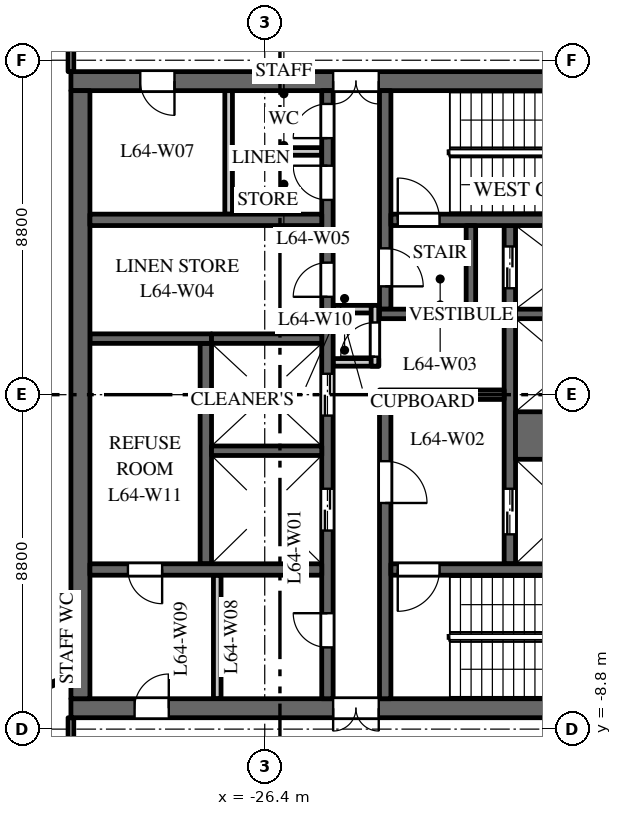
"""IFC4 building model, lengths in metres.
Left out: names, types, materials, properties, quantities, classifications, styles, units other than length and angle.
Written with IfcOpenShell. Run it as: python <this file> out.ifc"""

import sys

from ifc_helpers import new_model, si_unit, direction, frame, frame_2d, origin, place, context, subcontext, project, spatial, rectangle, extrude, element, fill, save


model = new_model("IFC4")
c1 = context("Model", 3, precision=1e-05, world=origin(), true_north=direction((0.0, 1.0)))
c2 = subcontext(c1, "Body", "Model", "MODEL_VIEW")
j1 = project(units=[si_unit("LENGTHUNIT", "METRE"), si_unit("PLANEANGLEUNIT", "RADIAN")], contexts=[c1])
p1 = place(None, origin())
s1 = spatial("IfcSite", under=j1, at=p1, CompositionType="ELEMENT")
p2 = place(p1, origin())
s2 = spatial("IfcBuilding", under=s1, at=p2, CompositionType="ELEMENT")
p3 = place(p2, frame((0.0, 0.0, 299.0)))
s3 = spatial("IfcBuildingStorey", under=s2, at=p3, CompositionType="ELEMENT", Elevation=299.0)
p4 = place(p3, frame((-16.5, 8.25, 0.0), z_axis=(0.0, 0.0, 1.0), x_axis=(-1.0, 0.0, 0.0)))
e1 = element("IfcWall", 1, at=p4, inside=s3, PredefinedType="SHEAR", context=c2, shape_type="SweptSolid", body=[
    extrude(rectangle(XDim=15.0, YDim=0.5, at=frame_2d((7.5, 0.0))), origin(), (0.0, 0.0, 1.0), 3.7),
])
p5 = place(p4, frame((6.9, 0.0, 0.0)))
e2 = element("IfcOpeningElement", 2, at=p5, cuts=e1, PredefinedType="OPENING", context=c2, shape_type="SweptSolid", body=[
    extrude(rectangle(XDim=1.2, YDim=2.1, at=frame_2d((0.6, 1.05))), frame((0.0, 0.26, 0.0), z_axis=(0.0, -1.0, 0.0), x_axis=(1.0, 0.0, 0.0)), (0.0, 0.0, 1.0), 0.52),
])
p6 = place(p4, frame((12.275, 0.0, 0.0)))
e3 = element("IfcOpeningElement", 3, at=p6, cuts=e1, PredefinedType="OPENING", context=c2, shape_type="SweptSolid", body=[
    extrude(rectangle(XDim=0.9, YDim=2.1, at=frame_2d((0.45, 1.05))), frame((0.0, 0.26, 0.0), z_axis=(0.0, -1.0, 0.0), x_axis=(1.0, 0.0, 0.0)), (0.0, 0.0, 1.0), 0.52),
])
p7 = place(p3, frame((-16.5, -8.25, 0.0), z_axis=(0.0, 0.0, 1.0), x_axis=(-1.0, 0.0, 0.0)))
e4 = element("IfcWall", 4, at=p7, inside=s3, PredefinedType="SHEAR", context=c2, shape_type="SweptSolid", body=[
    extrude(rectangle(XDim=15.0, YDim=0.5, at=frame_2d((7.5, 0.0))), origin(), (0.0, 0.0, 1.0), 3.7),
])
p8 = place(p7, frame((6.9, 0.0, 0.0)))
e5 = element("IfcOpeningElement", 5, at=p8, cuts=e4, PredefinedType="OPENING", context=c2, shape_type="SweptSolid", body=[
    extrude(rectangle(XDim=1.2, YDim=2.1, at=frame_2d((0.6, 1.05))), frame((0.0, 0.26, 0.0), z_axis=(0.0, -1.0, 0.0), x_axis=(1.0, 0.0, 0.0)), (0.0, 0.0, 1.0), 0.52),
])
p9 = place(p7, frame((12.425, 0.0, 0.0)))
e6 = element("IfcOpeningElement", 6, at=p9, cuts=e4, PredefinedType="OPENING", context=c2, shape_type="SweptSolid", body=[
    extrude(rectangle(XDim=0.9, YDim=2.1, at=frame_2d((0.45, 1.05))), frame((0.0, 0.26, 0.0), z_axis=(0.0, -1.0, 0.0), x_axis=(1.0, 0.0, 0.0)), (0.0, 0.0, 1.0), 0.52),
])
p10 = place(p3, frame((-27.95, -4.45, 0.0), z_axis=(0.0, 0.0, 1.0), x_axis=(0.0, 1.0, 0.0)))
e7 = element("IfcWall", 7, at=p10, inside=s3, PredefinedType="SHEAR", context=c2, shape_type="SweptSolid", body=[
    extrude(rectangle(XDim=5.8, YDim=0.3, at=frame_2d((2.9, 0.0))), origin(), (0.0, 0.0, 1.0), 3.7),
])
p11 = place(p3, frame((-27.8, 1.475, 0.0), z_axis=(0.0, 0.0, 1.0), x_axis=(-1.0, 0.0, 0.0)))
e8 = element("IfcWall", 8, at=p11, inside=s3, PredefinedType="SHEAR", context=c2, shape_type="SweptSolid", body=[
    extrude(rectangle(XDim=3.2, YDim=0.25, at=frame_2d((1.6, 0.0))), origin(), (0.0, 0.0, 1.0), 3.7),
])
p12 = place(p3, frame((-19.95, -4.45, 0.0), z_axis=(0.0, 0.0, 1.0), x_axis=(0.0, 1.0, 0.0)))
e9 = element("IfcWall", 9, at=p12, inside=s3, PredefinedType="SHEAR", context=c2, shape_type="SweptSolid", body=[
    extrude(rectangle(XDim=8.9, YDim=0.3, at=frame_2d((4.45, 0.0))), origin(), (0.0, 0.0, 1.0), 3.7),
])
p13 = place(p12, frame((0.775, 0.0, 0.0)))
e10 = element("IfcOpeningElement", 10, at=p13, cuts=e9, PredefinedType="OPENING", context=c2, shape_type="SweptSolid", body=[
    extrude(rectangle(XDim=1.2, YDim=2.1, at=frame_2d((0.6, 1.05))), frame((0.0, 0.16, 0.0), z_axis=(0.0, -1.0, 0.0), x_axis=(1.0, 0.0, 0.0)), (0.0, 0.0, 1.0), 0.32),
])
p14 = place(p12, frame((7.25, 0.0, 0.0)))
e11 = element("IfcOpeningElement", 11, at=p14, cuts=e9, PredefinedType="OPENING", context=c2, shape_type="SweptSolid", body=[
    extrude(rectangle(XDim=1.1, YDim=2.1, at=frame_2d((0.55, 1.05))), frame((0.0, 0.16, 0.0), z_axis=(0.0, -1.0, 0.0), x_axis=(1.0, 0.0, 0.0)), (0.0, 0.0, 1.0), 0.32),
])
p15 = place(p3, frame((-24.75, -8.0, 0.0), z_axis=(0.0, 0.0, 1.0), x_axis=(0.0, 1.0, 0.0)))
e12 = element("IfcWall", 12, at=p15, inside=s3, PredefinedType="SHEAR", context=c2, shape_type="SweptSolid", body=[
    extrude(rectangle(XDim=16.0, YDim=0.3, at=frame_2d((8.0, 0.0))), origin(), (0.0, 0.0, 1.0), 3.7),
])
p16 = place(p15, frame((4.425, 0.0, 0.0)))
e13 = element("IfcOpeningElement", 13, at=p16, cuts=e12, PredefinedType="OPENING", context=c2, shape_type="SweptSolid", body=[
    extrude(rectangle(XDim=1.1, YDim=2.1, at=frame_2d((0.55, 1.05))), frame((0.0, 0.16, 0.0), z_axis=(0.0, -1.0, 0.0), x_axis=(1.0, 0.0, 0.0)), (0.0, 0.0, 1.0), 0.32),
])
p17 = place(p15, frame((7.45, 0.0, 0.0)))
e14 = element("IfcOpeningElement", 14, at=p17, cuts=e12, PredefinedType="OPENING", context=c2, shape_type="SweptSolid", body=[
    extrude(rectangle(XDim=1.1, YDim=2.1, at=frame_2d((0.55, 1.05))), frame((0.0, 0.16, 0.0), z_axis=(0.0, -1.0, 0.0), x_axis=(1.0, 0.0, 0.0)), (0.0, 0.0, 1.0), 0.32),
])
p18 = place(p15, frame((10.575, 0.0, 0.0)))
e15 = element("IfcOpeningElement", 15, at=p18, cuts=e12, PredefinedType="OPENING", context=c2, shape_type="SweptSolid", body=[
    extrude(rectangle(XDim=0.9, YDim=2.1, at=frame_2d((0.45, 1.05))), frame((0.0, 0.16, 0.0), z_axis=(0.0, -1.0, 0.0), x_axis=(1.0, 0.0, 0.0)), (0.0, 0.0, 1.0), 0.32),
])
p19 = place(p15, frame((13.125, 0.0, 0.0)))
e16 = element("IfcOpeningElement", 16, at=p19, cuts=e12, PredefinedType="OPENING", context=c2, shape_type="SweptSolid", body=[
    extrude(rectangle(XDim=0.9, YDim=2.1, at=frame_2d((0.45, 1.05))), frame((0.0, 0.16, 0.0), z_axis=(0.0, -1.0, 0.0), x_axis=(1.0, 0.0, 0.0)), (0.0, 0.0, 1.0), 0.32),
])
p20 = place(p15, frame((14.75, 0.0, 0.0)))
e17 = element("IfcOpeningElement", 17, at=p20, cuts=e12, PredefinedType="OPENING", context=c2, shape_type="SweptSolid", body=[
    extrude(rectangle(XDim=0.9, YDim=2.1, at=frame_2d((0.45, 1.05))), frame((0.0, 0.16, 0.0), z_axis=(0.0, -1.0, 0.0), x_axis=(1.0, 0.0, 0.0)), (0.0, 0.0, 1.0), 0.32),
])
p21 = place(p15, frame((1.35, 0.0, 0.0)))
e18 = element("IfcOpeningElement", 18, at=p21, cuts=e12, PredefinedType="OPENING", context=c2, shape_type="SweptSolid", body=[
    extrude(rectangle(XDim=0.9, YDim=2.1, at=frame_2d((0.45, 1.05))), frame((0.0, 0.16, 0.0), z_axis=(0.0, -1.0, 0.0), x_axis=(1.0, 0.0, 0.0)), (0.0, 0.0, 1.0), 0.32),
])
p22 = place(p3, frame((-20.1, 0.0, 0.0), z_axis=(0.0, 0.0, 1.0), x_axis=(-1.0, 0.0, 0.0)))
e19 = element("IfcWall", 19, at=p22, inside=s3, PredefinedType="SHEAR", context=c2, shape_type="SweptSolid", body=[
    extrude(rectangle(XDim=3.28, YDim=0.25, at=frame_2d((1.64, 0.0))), origin(), (0.0, 0.0, 1.0), 3.7),
])
for number, where, z_axis, x_axis in (
    (20, (-23.4, 0.85, 0.0), (0.0, 0.0, 1.0), (-1.0, 0.0, 0.0)),
    (21, (-23.4, 2.25, 0.0), (0.0, 0.0, 1.0), (-1.0, 0.0, 0.0)),
):
    element("IfcWall", number, at=place(p3, frame(where, z_axis=z_axis, x_axis=x_axis)), inside=s3, PredefinedType="PARTITIONING", context=c2, shape_type="SweptSolid", body=[
        extrude(rectangle(XDim=1.2, YDim=0.2, at=frame_2d((0.6, 0.0))), origin(), (0.0, 0.0, 1.0), 3.7),
    ])
p23 = place(p3, frame((-23.5, 0.75, 0.0), z_axis=(0.0, 0.0, 1.0), x_axis=(0.0, 1.0, 0.0)))
e22 = element("IfcWall", 22, at=p23, inside=s3, PredefinedType="PARTITIONING", context=c2, shape_type="SweptSolid", body=[
    extrude(rectangle(XDim=1.6, YDim=0.2, at=frame_2d((0.8, 0.0))), origin(), (0.0, 0.0, 1.0), 3.7),
])
p24 = place(p23, frame((0.25, 0.0, 0.0)))
e23 = element("IfcOpeningElement", 23, at=p24, cuts=e22, PredefinedType="OPENING", context=c2, shape_type="SweptSolid", body=[
    extrude(rectangle(XDim=0.9, YDim=2.1, at=frame_2d((0.45, 1.05))), frame((0.0, 0.11, 0.0), z_axis=(0.0, -1.0, 0.0), x_axis=(1.0, 0.0, 0.0)), (0.0, 0.0, 1.0), 0.22),
])
p25 = place(p3, frame((-31.25, -8.0, 0.0), z_axis=(0.0, 0.0, 1.0), x_axis=(0.0, 1.0, 0.0)))
e24 = element("IfcWall", 24, at=p25, inside=s3, PredefinedType="SHEAR", context=c2, shape_type="SweptSolid", body=[
    extrude(rectangle(XDim=16.0, YDim=0.5, at=frame_2d((8.0, 0.0))), origin(), (0.0, 0.0, 1.0), 3.7),
])
p26 = place(p3, frame((-24.9, 4.6, 0.0), z_axis=(0.0, 0.0, 1.0), x_axis=(-1.0, 0.0, 0.0)))
e25 = element("IfcWall", 25, at=p26, inside=s3, PredefinedType="SHEAR", context=c2, shape_type="SweptSolid", body=[
    extrude(rectangle(XDim=6.1, YDim=0.3, at=frame_2d((3.05, 0.0))), origin(), (0.0, 0.0, 1.0), 3.7),
])
for number, where, z_axis, x_axis in (
    (26, (-27.35, 4.75, 0.0), (0.0, 0.0, 1.0), (0.0, 1.0, 0.0)),
    (27, (-27.65, -8.0, 0.0), (0.0, 0.0, 1.0), (0.0, 1.0, 0.0)),
):
    element("IfcWall", number, at=place(p3, frame(where, z_axis=z_axis, x_axis=x_axis)), inside=s3, PredefinedType="PARTITIONING", context=c2, shape_type="SweptSolid", body=[
        extrude(rectangle(XDim=3.25, YDim=0.2, at=frame_2d((1.625, 0.0))), origin(), (0.0, 0.0, 1.0), 3.7),
    ])
p27 = place(p3, frame((-24.9, 6.4, 0.0), z_axis=(0.0, 0.0, 1.0), x_axis=(-1.0, 0.0, 0.0)))
e28 = element("IfcWall", 28, at=p27, inside=s3, PredefinedType="PARTITIONING", context=c2, shape_type="SweptSolid", body=[
    extrude(rectangle(XDim=2.35, YDim=0.2, at=frame_2d((1.175, 0.0))), origin(), (0.0, 0.0, 1.0), 3.7),
])
p28 = place(p3, frame((-24.9, -4.6, 0.0), z_axis=(0.0, 0.0, 1.0), x_axis=(-1.0, 0.0, 0.0)))
e29 = element("IfcWall", 29, at=p28, inside=s3, PredefinedType="SHEAR", context=c2, shape_type="SweptSolid", body=[
    extrude(rectangle(XDim=6.1, YDim=0.3, at=frame_2d((3.05, 0.0))), origin(), (0.0, 0.0, 1.0), 3.7),
])
p29 = place(p28, frame((4.2, 0.0, 0.0)))
e30 = element("IfcOpeningElement", 30, at=p29, cuts=e29, PredefinedType="OPENING", context=c2, shape_type="SweptSolid", body=[
    extrude(rectangle(XDim=0.9, YDim=2.1, at=frame_2d((0.45, 1.05))), frame((0.0, 0.16, 0.0), z_axis=(0.0, -1.0, 0.0), x_axis=(1.0, 0.0, 0.0)), (0.0, 0.0, 1.0), 0.32),
])
p30 = place(p3, frame((-16.9, -1.075, 0.0), z_axis=(0.0, 0.0, 1.0), x_axis=(-1.0, 0.0, 0.0)))
e31 = element("IfcWall", 31, at=p30, inside=s3, PredefinedType="SHEAR", context=c2, shape_type="SweptSolid", body=[
    extrude(rectangle(XDim=2.9, YDim=1.25, at=frame_2d((1.45, 0.0))), origin(), (0.0, 0.0, 1.0), 3.7),
])
for number, where, z_axis, x_axis in (
    (32, (-16.9, 2.125, 0.0), (0.0, 0.0, 1.0), (-1.0, 0.0, 0.0)),
    (33, (-24.9, -1.475, 0.0), (0.0, 0.0, 1.0), (-1.0, 0.0, 0.0)),
    (34, (-24.9, 1.475, 0.0), (0.0, 0.0, 1.0), (-1.0, 0.0, 0.0)),
):
    element("IfcWall", number, at=place(p3, frame(where, z_axis=z_axis, x_axis=x_axis)), inside=s3, PredefinedType="SHEAR", context=c2, shape_type="SweptSolid", body=[
        extrude(rectangle(XDim=2.9, YDim=0.25, at=frame_2d((1.45, 0.0))), origin(), (0.0, 0.0, 1.0), 3.7),
    ])
p31 = place(p3, frame((-23.23, 2.25, 0.0), z_axis=(0.0, 0.0, 1.0), x_axis=(0.0, 1.0, 0.0)))
e35 = element("IfcWall", 35, at=p31, inside=s3, PredefinedType="SHEAR", context=c2, shape_type="SweptSolid", body=[
    extrude(rectangle(XDim=5.75, YDim=0.3, at=frame_2d((2.875, 0.0))), origin(), (0.0, 0.0, 1.0), 3.7),
])
p32 = place(p31, frame((0.6, 0.0, 0.0)))
e36 = element("IfcOpeningElement", 36, at=p32, cuts=e35, PredefinedType="OPENING", context=c2, shape_type="SweptSolid", body=[
    extrude(rectangle(XDim=1.0, YDim=2.1, at=frame_2d((0.5, 1.05))), frame((0.0, 0.16, 0.0), z_axis=(0.0, -1.0, 0.0), x_axis=(1.0, 0.0, 0.0)), (0.0, 0.0, 1.0), 0.32),
])
p33 = place(p3, frame((-23.23, -8.0, 0.0), z_axis=(0.0, 0.0, 1.0), x_axis=(0.0, 1.0, 0.0)))
e37 = element("IfcWall", 37, at=p33, inside=s3, PredefinedType="SHEAR", context=c2, shape_type="SweptSolid", body=[
    extrude(rectangle(XDim=7.875, YDim=0.3, at=frame_2d((3.938, 0.0))), origin(), (0.0, 0.0, 1.0), 3.7),
])
p34 = place(p33, frame((5.15, 0.0, 0.0)))
e38 = element("IfcOpeningElement", 38, at=p34, cuts=e37, PredefinedType="OPENING", context=c2, shape_type="SweptSolid", body=[
    extrude(rectangle(XDim=1.1, YDim=2.1, at=frame_2d((0.55, 1.05))), frame((0.0, 0.16, 0.0), z_axis=(0.0, -1.0, 0.0), x_axis=(1.0, 0.0, 0.0)), (0.0, 0.0, 1.0), 0.32),
])
p35 = place(p3, frame((-16.9, 4.6, 0.0), z_axis=(0.0, 0.0, 1.0), x_axis=(-1.0, 0.0, 0.0)))
e39 = element("IfcWall", 39, at=p35, inside=s3, PredefinedType="SHEAR", context=c2, shape_type="SweptSolid", body=[
    extrude(rectangle(XDim=6.18, YDim=0.3, at=frame_2d((3.09, 0.0))), origin(), (0.0, 0.0, 1.0), 3.7),
])
p36 = place(p35, frame((4.9, 0.0, 0.0)))
e40 = element("IfcOpeningElement", 40, at=p36, cuts=e39, PredefinedType="OPENING", context=c2, shape_type="SweptSolid", body=[
    extrude(rectangle(XDim=1.1, YDim=2.1, at=frame_2d((0.55, 1.05))), frame((0.0, 0.16, 0.0), z_axis=(0.0, -1.0, 0.0), x_axis=(1.0, 0.0, 0.0)), (0.0, 0.0, 1.0), 0.32),
])
p37 = place(p3, frame((-16.9, -4.6, 0.0), z_axis=(0.0, 0.0, 1.0), x_axis=(-1.0, 0.0, 0.0)))
e41 = element("IfcWall", 41, at=p37, inside=s3, PredefinedType="SHEAR", context=c2, shape_type="SweptSolid", body=[
    extrude(rectangle(XDim=6.18, YDim=0.3, at=frame_2d((3.09, 0.0))), origin(), (0.0, 0.0, 1.0), 3.7),
])
p38 = place(p37, frame((4.9, 0.0, 0.0)))
e42 = element("IfcOpeningElement", 42, at=p38, cuts=e41, PredefinedType="OPENING", context=c2, shape_type="SweptSolid", body=[
    extrude(rectangle(XDim=1.1, YDim=2.1, at=frame_2d((0.55, 1.05))), frame((0.0, 0.16, 0.0), z_axis=(0.0, -1.0, 0.0), x_axis=(1.0, 0.0, 0.0)), (0.0, 0.0, 1.0), 0.32),
])
p39 = place(p3, frame((-20.85, 2.125, 0.0), z_axis=(0.0, 0.0, 1.0), x_axis=(-1.0, 0.0, 0.0)))
e43 = element("IfcWall", 43, at=p39, inside=s3, PredefinedType="SHEAR", context=c2, shape_type="SweptSolid", body=[
    extrude(rectangle(XDim=2.53, YDim=0.25, at=frame_2d((1.265, 0.0))), origin(), (0.0, 0.0, 1.0), 3.7),
])
p40 = place(p3, frame((-20.975, 2.25, 0.0), z_axis=(0.0, 0.0, 1.0), x_axis=(0.0, 1.0, 0.0)))
e44 = element("IfcWall", 44, at=p40, inside=s3, PredefinedType="SHEAR", context=c2, shape_type="SweptSolid", body=[
    extrude(rectangle(XDim=2.2, YDim=0.25, at=frame_2d((1.1, 0.0))), origin(), (0.0, 0.0, 1.0), 3.7),
])
p41 = place(p3, frame((-34.234, -8.53, 0.0), z_axis=(0.0, 0.0, 1.0), x_axis=(0.925344112436, 0.379128307542, 0.0)))
e45 = element("IfcWall", 45, at=p41, inside=s3, PredefinedType="PARTITIONING", context=c2, shape_type="SweptSolid", body=[
    extrude(rectangle(XDim=2.954, YDim=0.1, at=frame_2d((1.477, 0.0))), origin(), (0.0, 0.0, 1.0), 3.0),
])
for number, where, z_axis, x_axis in (
    (46, (-31.5, -11.5, 0.0), (0.0, 0.0, 1.0), (0.0, 1.0, 0.0)),
    (47, (-31.5, 8.5, 0.0), (0.0, 0.0, 1.0), (0.0, 1.0, 0.0)),
):
    element("IfcWall", number, at=place(p3, frame(where, z_axis=z_axis, x_axis=x_axis)), inside=s3, PredefinedType="PARTITIONING", context=c2, shape_type="SweptSolid", body=[
        extrude(rectangle(XDim=3.0, YDim=0.15, at=frame_2d((1.5, 0.0))), origin(), (0.0, 0.0, 1.0), 3.0),
    ])
p42 = place(p13, origin())
e48 = element("IfcDoor", 48, at=p42, inside=s3, OperationType="DOUBLE_DOOR_SLIDING", PredefinedType="DOOR", context=c2, shape_type="SweptSolid", body=[
    extrude(rectangle(XDim=1.2, YDim=2.1, at=frame_2d((0.6, 1.05))), frame((0.0, 0.025, 0.0), z_axis=(0.0, -1.0, 0.0), x_axis=(1.0, 0.0, 0.0)), (0.0, 0.0, 1.0), 0.05),
])
fill(e10, e48)
p43 = place(p14, origin())
e49 = element("IfcDoor", 49, at=p43, inside=s3, OperationType="DOUBLE_DOOR_SLIDING", PredefinedType="DOOR", context=c2, shape_type="SweptSolid", body=[
    extrude(rectangle(XDim=1.1, YDim=2.1, at=frame_2d((0.55, 1.05))), frame((0.0, 0.025, 0.0), z_axis=(0.0, -1.0, 0.0), x_axis=(1.0, 0.0, 0.0)), (0.0, 0.0, 1.0), 0.05),
])
fill(e11, e49)
p44 = place(p16, origin())
e50 = element("IfcDoor", 50, at=p44, inside=s3, OperationType="DOUBLE_DOOR_SLIDING", PredefinedType="DOOR", context=c2, shape_type="SweptSolid", body=[
    extrude(rectangle(XDim=1.1, YDim=2.1, at=frame_2d((0.55, 1.05))), frame((0.0, 0.025, 0.0), z_axis=(0.0, -1.0, 0.0), x_axis=(1.0, 0.0, 0.0)), (0.0, 0.0, 1.0), 0.05),
])
fill(e13, e50)
p45 = place(p17, origin())
e51 = element("IfcDoor", 51, at=p45, inside=s3, OperationType="DOUBLE_DOOR_SLIDING", PredefinedType="DOOR", context=c2, shape_type="SweptSolid", body=[
    extrude(rectangle(XDim=1.1, YDim=2.1, at=frame_2d((0.55, 1.05))), frame((0.0, 0.025, 0.0), z_axis=(0.0, -1.0, 0.0), x_axis=(1.0, 0.0, 0.0)), (0.0, 0.0, 1.0), 0.05),
])
fill(e14, e51)
p46 = place(p36, origin())
e52 = element("IfcDoor", 52, at=p46, inside=s3, OperationType="SINGLE_SWING_RIGHT", PredefinedType="DOOR", context=c2, shape_type="SweptSolid", body=[
    extrude(rectangle(XDim=1.1, YDim=2.1, at=frame_2d((0.55, 1.05))), frame((0.0, 0.025, 0.0), z_axis=(0.0, -1.0, 0.0), x_axis=(1.0, 0.0, 0.0)), (0.0, 0.0, 1.0), 0.05),
])
fill(e40, e52)
p47 = place(p38, origin())
e53 = element("IfcDoor", 53, at=p47, inside=s3, OperationType="SINGLE_SWING_LEFT", PredefinedType="DOOR", context=c2, shape_type="SweptSolid", body=[
    extrude(rectangle(XDim=1.1, YDim=2.1, at=frame_2d((0.55, 1.05))), frame((0.0, 0.025, 0.0), z_axis=(0.0, -1.0, 0.0), x_axis=(1.0, 0.0, 0.0)), (0.0, 0.0, 1.0), 0.05),
])
fill(e42, e53)
p48 = place(p34, origin())
e54 = element("IfcDoor", 54, at=p48, inside=s3, OperationType="SINGLE_SWING_LEFT", PredefinedType="DOOR", context=c2, shape_type="SweptSolid", body=[
    extrude(rectangle(XDim=1.1, YDim=2.1, at=frame_2d((0.55, 1.05))), frame((0.0, 0.025, 0.0), z_axis=(0.0, -1.0, 0.0), x_axis=(1.0, 0.0, 0.0)), (0.0, 0.0, 1.0), 0.05),
])
fill(e38, e54)
p49 = place(p32, origin())
e55 = element("IfcDoor", 55, at=p49, inside=s3, OperationType="SINGLE_SWING_LEFT", PredefinedType="DOOR", context=c2, shape_type="SweptSolid", body=[
    extrude(rectangle(XDim=1.0, YDim=2.1, at=frame_2d((0.5, 1.05))), frame((0.0, 0.025, 0.0), z_axis=(0.0, -1.0, 0.0), x_axis=(1.0, 0.0, 0.0)), (0.0, 0.0, 1.0), 0.05),
])
fill(e36, e55)
p50 = place(p5, origin())
e56 = element("IfcDoor", 56, at=p50, inside=s3, OperationType="DOUBLE_DOOR_DOUBLE_SWING", PredefinedType="DOOR", context=c2, shape_type="SweptSolid", body=[
    extrude(rectangle(XDim=1.2, YDim=2.1, at=frame_2d((0.6, 1.05))), frame((0.0, 0.025, 0.0), z_axis=(0.0, -1.0, 0.0), x_axis=(1.0, 0.0, 0.0)), (0.0, 0.0, 1.0), 0.05),
])
fill(e2, e56)
p51 = place(p8, origin())
e57 = element("IfcDoor", 57, at=p51, inside=s3, OperationType="DOUBLE_DOOR_DOUBLE_SWING", PredefinedType="DOOR", context=c2, shape_type="SweptSolid", body=[
    extrude(rectangle(XDim=1.2, YDim=2.1, at=frame_2d((0.6, 1.05))), frame((0.0, 0.025, 0.0), z_axis=(0.0, -1.0, 0.0), x_axis=(1.0, 0.0, 0.0)), (0.0, 0.0, 1.0), 0.05),
])
fill(e5, e57)
p52 = place(p18, origin())
e58 = element("IfcDoor", 58, at=p52, inside=s3, OperationType="SINGLE_SWING_RIGHT", PredefinedType="DOOR", context=c2, shape_type="SweptSolid", body=[
    extrude(rectangle(XDim=0.9, YDim=2.1, at=frame_2d((0.45, 1.05))), frame((0.0, 0.025, 0.0), z_axis=(0.0, -1.0, 0.0), x_axis=(1.0, 0.0, 0.0)), (0.0, 0.0, 1.0), 0.05),
])
fill(e15, e58)
p53 = place(p19, origin())
e59 = element("IfcDoor", 59, at=p53, inside=s3, OperationType="SINGLE_SWING_LEFT", PredefinedType="DOOR", context=c2, shape_type="SweptSolid", body=[
    extrude(rectangle(XDim=0.9, YDim=2.1, at=frame_2d((0.45, 1.05))), frame((0.0, 0.025, 0.0), z_axis=(0.0, -1.0, 0.0), x_axis=(1.0, 0.0, 0.0)), (0.0, 0.0, 1.0), 0.05),
])
fill(e16, e59)
p54 = place(p20, origin())
e60 = element("IfcDoor", 60, at=p54, inside=s3, OperationType="SINGLE_SWING_RIGHT", PredefinedType="DOOR", context=c2, shape_type="SweptSolid", body=[
    extrude(rectangle(XDim=0.9, YDim=2.1, at=frame_2d((0.45, 1.05))), frame((0.0, 0.025, 0.0), z_axis=(0.0, -1.0, 0.0), x_axis=(1.0, 0.0, 0.0)), (0.0, 0.0, 1.0), 0.05),
])
fill(e17, e60)
p55 = place(p6, origin())
e61 = element("IfcDoor", 61, at=p55, inside=s3, OperationType="SINGLE_SWING_RIGHT", PredefinedType="DOOR", context=c2, shape_type="SweptSolid", body=[
    extrude(rectangle(XDim=0.9, YDim=2.1, at=frame_2d((0.45, 1.05))), frame((0.0, 0.025, 0.0), z_axis=(0.0, -1.0, 0.0), x_axis=(1.0, 0.0, 0.0)), (0.0, 0.0, 1.0), 0.05),
])
fill(e3, e61)
p56 = place(p21, origin())
e62 = element("IfcDoor", 62, at=p56, inside=s3, OperationType="SINGLE_SWING_LEFT", PredefinedType="DOOR", context=c2, shape_type="SweptSolid", body=[
    extrude(rectangle(XDim=0.9, YDim=2.1, at=frame_2d((0.45, 1.05))), frame((0.0, 0.025, 0.0), z_axis=(0.0, -1.0, 0.0), x_axis=(1.0, 0.0, 0.0)), (0.0, 0.0, 1.0), 0.05),
])
fill(e18, e62)
p57 = place(p9, origin())
e63 = element("IfcDoor", 63, at=p57, inside=s3, OperationType="SINGLE_SWING_LEFT", PredefinedType="DOOR", context=c2, shape_type="SweptSolid", body=[
    extrude(rectangle(XDim=0.9, YDim=2.1, at=frame_2d((0.45, 1.05))), frame((0.0, 0.025, 0.0), z_axis=(0.0, -1.0, 0.0), x_axis=(1.0, 0.0, 0.0)), (0.0, 0.0, 1.0), 0.05),
])
fill(e6, e63)
p58 = place(p24, origin())
e64 = element("IfcDoor", 64, at=p58, inside=s3, OperationType="SINGLE_SWING_RIGHT", PredefinedType="DOOR", context=c2, shape_type="SweptSolid", body=[
    extrude(rectangle(XDim=0.9, YDim=2.1, at=frame_2d((0.45, 1.05))), frame((0.0, 0.025, 0.0), z_axis=(0.0, -1.0, 0.0), x_axis=(1.0, 0.0, 0.0)), (0.0, 0.0, 1.0), 0.05),
])
fill(e23, e64)
p59 = place(p29, origin())
e65 = element("IfcDoor", 65, at=p59, inside=s3, OperationType="SINGLE_SWING_RIGHT", PredefinedType="DOOR", context=c2, shape_type="SweptSolid", body=[
    extrude(rectangle(XDim=0.9, YDim=2.1, at=frame_2d((0.45, 1.05))), frame((0.0, 0.025, 0.0), z_axis=(0.0, -1.0, 0.0), x_axis=(1.0, 0.0, 0.0)), (0.0, 0.0, 1.0), 0.05),
])
fill(e30, e65)
save(model, sys.argv[1])
